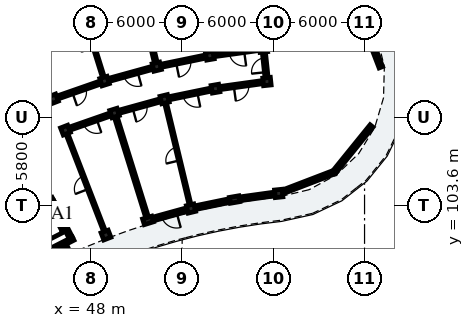
"""IFC4 building model, lengths in metres.
Left out: names, types, materials, properties, quantities, classifications, styles, units other than length and angle.
Written with IfcOpenShell. Run it as: python <this file> out.ifc"""

import sys

from ifc_helpers import new_model, si_unit, direction, frame, frame_2d, origin, origin_2d, place, context, subcontext, project, spatial, rectangle, extrude, element, fill, save


model = new_model("IFC4")
c1 = context("Model", 3, precision=1e-05, world=origin(), true_north=direction((0.0, 1.0)))
c2 = subcontext(c1, "Body", "Model", "MODEL_VIEW")
j1 = project(units=[si_unit("LENGTHUNIT", "METRE"), si_unit("PLANEANGLEUNIT", "RADIAN")], contexts=[c1])
p1 = place(None, origin())
s1 = spatial("IfcSite", under=j1, at=p1, CompositionType="ELEMENT")
p2 = place(p1, origin())
s2 = spatial("IfcBuilding", under=s1, at=p2, CompositionType="ELEMENT")
p3 = place(p2, frame((0.0, 0.0, 29.0)))
s3 = spatial("IfcBuildingStorey", under=s2, at=p3, CompositionType="ELEMENT", Elevation=29.0)
p4 = place(p3, frame((42.597, 102.561, 0.0), z_axis=(0.0, 0.0, 1.0), x_axis=(0.891001200497, 0.454000947921, 0.0)))
e1 = element("IfcWall", 1, at=p4, inside=s3, PredefinedType="SHEAR", context=c2, shape_type="SweptSolid", body=[
    extrude(rectangle(XDim=3.26, YDim=0.23, at=frame_2d((1.63, 0.0))), origin(), (0.0, 0.0, 1.0), 3.11),
])
p5 = place(p4, frame((0.9, 0.0, 0.0)))
e2 = element("IfcOpeningElement", 2, at=p5, cuts=e1, PredefinedType="OPENING", context=c2, shape_type="SweptSolid", body=[
    extrude(rectangle(XDim=1.1, YDim=2.15, at=frame_2d((0.55, 1.075))), frame((0.0, 0.125, 0.0), z_axis=(0.0, -1.0, 0.0), x_axis=(1.0, 0.0, 0.0)), (0.0, 0.0, 1.0), 0.25),
])
p6 = place(p3, frame((43.927, 99.95, 0.0), z_axis=(0.0, 0.0, 1.0), x_axis=(0.891016635648, 0.453970654337, 0.0)))
e3 = element("IfcWall", 3, at=p6, inside=s3, PredefinedType="SHEAR", context=c2, shape_type="SweptSolid", body=[
    extrude(rectangle(XDim=3.26, YDim=0.23, at=frame_2d((1.63, 0.0))), origin(), (0.0, 0.0, 1.0), 3.11),
])
p7 = place(p3, frame((45.451, 103.886, 0.0), z_axis=(0.0, 0.0, 1.0), x_axis=(0.454000278178, -0.891001541758, 0.0)))
e4 = element("IfcWall", 4, at=p7, inside=s3, PredefinedType="SHEAR", context=c2, shape_type="SweptSolid", body=[
    extrude(rectangle(XDim=2.7, YDim=0.23, at=frame_2d((1.35, 0.0))), origin(), (0.0, 0.0, 1.0), 3.11),
])
for number, where, z_axis, x_axis in (
    (5, (60.354, 104.406, 0.0), (0.0, 0.0, 1.0), (-0.105, 0.995, 0.0)),
    (6, (59.58, 111.766, 0.0), (0.0, 0.0, 1.0), (-0.105, 0.995, 0.0)),
    (7, (59.35, 113.954, 0.0), (0.0, 0.0, 1.0), (-0.105, 0.995, 0.0)),
):
    element("IfcColumn", number, at=place(p3, frame(where, z_axis=z_axis, x_axis=x_axis)), inside=s3, PredefinedType="COLUMN", context=c2, shape_type="SweptSolid", body=[
        extrude(rectangle(XDim=0.5, YDim=0.5, at=origin_2d()), origin(), (0.0, 0.0, 1.0), 3.115),
    ])
p8 = place(p3, frame((57.451, 104.004, 0.0), z_axis=(0.0, 0.0, 1.0), x_axis=(-0.169827298811, 0.985473839622, 0.0)))
e8 = element("IfcColumn", 8, at=p8, inside=s3, PredefinedType="PILASTER", context=c2, shape_type="SweptSolid", body=[
    extrude(rectangle(XDim=0.39, YDim=0.63, at=origin_2d()), origin(), (0.0, 0.0, 1.0), 3.115),
])
for number, where, z_axis, x_axis in (
    (9, (56.194, 111.297, 0.0), (0.0, 0.0, 1.0), (-0.17, 0.985, 0.0)),
    (10, (55.821, 113.465, 0.0), (0.0, 0.0, 1.0), (-0.17, 0.985, 0.0)),
    (11, (54.582, 103.412, 0.0), (0.0, 0.0, 1.0), (-0.234, 0.972, 0.0)),
    (12, (52.847, 110.606, 0.0), (0.0, 0.0, 1.0), (-0.234, 0.972, 0.0)),
    (13, (52.331, 112.744, 0.0), (0.0, 0.0, 1.0), (-0.234, 0.972, 0.0)),
):
    element("IfcColumn", number, at=place(p3, frame(where, z_axis=z_axis, x_axis=x_axis)), inside=s3, PredefinedType="COLUMN", context=c2, shape_type="SweptSolid", body=[
        extrude(rectangle(XDim=0.5, YDim=0.5, at=origin_2d()), origin(), (0.0, 0.0, 1.0), 3.115),
    ])
p9 = place(p3, frame((51.757, 102.631, 0.0), z_axis=(0.0, 0.0, 1.0), x_axis=(-0.297930292146, 0.954587628781, 0.0)))
e14 = element("IfcColumn", 14, at=p9, inside=s3, PredefinedType="PILASTER", context=c2, shape_type="SweptSolid", body=[
    extrude(rectangle(XDim=0.39, YDim=0.63, at=origin_2d()), origin(), (0.0, 0.0, 1.0), 3.115),
])
for number, where, z_axis, x_axis in (
    (15, (49.552, 109.695, 0.0), (0.0, 0.0, 1.0), (-0.298, 0.955, 0.0)),
    (16, (48.897, 111.795, 0.0), (0.0, 0.0, 1.0), (-0.298, 0.955, 0.0)),
    (17, (48.99, 101.667, 0.0), (0.0, 0.0, 1.0), (-0.36, 0.933, 0.0)),
    (18, (46.325, 108.57, 0.0), (0.0, 0.0, 1.0), (-0.36, 0.933, 0.0)),
    (19, (45.532, 110.622, 0.0), (0.0, 0.0, 1.0), (-0.36, 0.933, 0.0)),
):
    element("IfcColumn", number, at=place(p3, frame(where, z_axis=z_axis, x_axis=x_axis)), inside=s3, PredefinedType="COLUMN", context=c2, shape_type="SweptSolid", body=[
        extrude(rectangle(XDim=0.5, YDim=0.5, at=origin_2d()), origin(), (0.0, 0.0, 1.0), 3.115),
    ])
p10 = place(p3, frame((46.293, 100.522, 0.0), z_axis=(0.0, 0.0, 1.0), x_axis=(-0.420859924104, 0.907125638643, 0.0)))
e20 = element("IfcColumn", 20, at=p10, inside=s3, PredefinedType="PILASTER", context=c2, shape_type="SweptSolid", body=[
    extrude(rectangle(XDim=0.39, YDim=0.63, at=origin_2d()), origin(), (0.0, 0.0, 1.0), 3.115),
])
p11 = place(p3, frame((60.136, 104.376, 0.0), z_axis=(0.0, 0.0, 1.0), x_axis=(-0.990535426945, -0.137257305699, 0.0)))
e21 = element("IfcWall", 21, at=p11, inside=s3, PredefinedType="SOLIDWALL", context=c2, shape_type="SweptSolid", body=[
    extrude(rectangle(XDim=2.545, YDim=0.245, at=frame_2d((1.273, 0.0))), origin(), (0.0, 0.0, 1.0), 2.355),
])
p12 = place(p11, frame((0.683, 0.0, 0.55)))
e22 = element("IfcOpeningElement", 22, at=p12, cuts=e21, PredefinedType="OPENING", context=c2, shape_type="SweptSolid", body=[
    extrude(rectangle(XDim=1.18, YDim=1.48, at=frame_2d((0.59, 0.74))), frame((0.0, 0.133, 0.0), z_axis=(0.0, -1.0, 0.0), x_axis=(1.0, 0.0, 0.0)), (0.0, 0.0, 1.0), 0.265),
])
p13 = place(p3, frame((57.29, 103.971, 0.0), z_axis=(0.0, 0.0, 1.0), x_axis=(-0.979344333802, -0.20219959409, 0.0)))
e23 = element("IfcWall", 23, at=p13, inside=s3, PredefinedType="SOLIDWALL", context=c2, shape_type="SweptSolid", body=[
    extrude(rectangle(XDim=2.545, YDim=0.245, at=frame_2d((1.272, 0.0))), origin(), (0.0, 0.0, 1.0), 2.355),
])
p14 = place(p13, frame((0.533, 0.0, 0.55)))
e24 = element("IfcOpeningElement", 24, at=p14, cuts=e23, PredefinedType="OPENING", context=c2, shape_type="SweptSolid", body=[
    extrude(rectangle(XDim=1.48, YDim=1.62, at=frame_2d((0.74, 0.81))), frame((0.0, 0.133, 0.0), z_axis=(0.0, -1.0, 0.0), x_axis=(1.0, 0.0, 0.0)), (0.0, 0.0, 1.0), 0.265),
])
p15 = place(p3, frame((54.369, 103.353, 0.0), z_axis=(0.0, 0.0, 1.0), x_axis=(-0.963872968618, -0.26636234788, 0.0)))
e25 = element("IfcWall", 25, at=p15, inside=s3, PredefinedType="SOLIDWALL", context=c2, shape_type="SweptSolid", body=[
    extrude(rectangle(XDim=2.545, YDim=0.245, at=frame_2d((1.273, 0.0))), origin(), (0.0, 0.0, 1.0), 2.355),
])
p16 = place(p15, frame((0.763, 0.0, 0.0)))
e26 = element("IfcOpeningElement", 26, at=p16, cuts=e25, PredefinedType="OPENING", context=c2, shape_type="SweptSolid", body=[
    extrude(rectangle(XDim=1.02, YDim=2.14, at=frame_2d((0.51, 1.07))), frame((0.0, 0.133, 0.0), z_axis=(0.0, -1.0, 0.0), x_axis=(1.0, 0.0, 0.0)), (0.0, 0.0, 1.0), 0.265),
])
p17 = place(p3, frame((65.673, 116.353, 0.0), z_axis=(0.0, 0.0, 1.0), x_axis=(0.358376224971, -0.933577249817, 0.0)))
e27 = element("IfcWall", 27, at=p17, inside=s3, PredefinedType="SOLIDWALL", context=c2, shape_type="SweptSolid", body=[
    extrude(rectangle(XDim=3.908, YDim=0.245, at=frame_2d((1.954, 0.0))), origin(), (0.0, 0.0, 1.0), 2.355),
])
p18 = place(p3, frame((66.462, 108.844, 0.0), z_axis=(0.0, 0.0, 1.0), x_axis=(-0.629331205321, -0.777137204109, 0.0)))
e28 = element("IfcWall", 28, at=p18, inside=s3, PredefinedType="SOLIDWALL", context=c2, shape_type="SweptSolid", body=[
    extrude(rectangle(XDim=3.908, YDim=0.245, at=frame_2d((1.954, 0.0))), origin(), (0.0, 0.0, 1.0), 2.355),
])
p19 = place(p18, frame((0.979, 0.0, 0.4)))
e29 = element("IfcOpeningElement", 29, at=p19, cuts=e28, PredefinedType="OPENING", context=c2, shape_type="SweptSolid", body=[
    extrude(rectangle(XDim=1.95, YDim=1.78, at=frame_2d((0.975, 0.89))), frame((0.0, 0.133, 0.0), z_axis=(0.0, -1.0, 0.0), x_axis=(1.0, 0.0, 0.0)), (0.0, 0.0, 1.0), 0.265),
])
p20 = place(p3, frame((64.002, 105.807, 0.0), z_axis=(0.0, 0.0, 1.0), x_axis=(-0.93356922619, -0.35839712598, 0.0)))
e30 = element("IfcWall", 30, at=p20, inside=s3, PredefinedType="SOLIDWALL", context=c2, shape_type="SweptSolid", body=[
    extrude(rectangle(XDim=3.908, YDim=0.245, at=frame_2d((1.954, 0.0))), origin(), (0.0, 0.0, 1.0), 2.355),
])
p21 = place(p3, frame((59.004, 113.906, 0.0), z_axis=(0.0, 0.0, 1.0), x_axis=(-0.990544162976, -0.137194246211, 0.0)))
e31 = element("IfcWall", 31, at=p21, inside=s3, PredefinedType="PARTITIONING", context=c2, shape_type="SweptSolid", body=[
    extrude(rectangle(XDim=2.863, YDim=0.205, at=frame_2d((1.432, 0.0))), origin(), (0.0, 0.0, 1.0), 2.37),
])
p22 = place(p21, frame((0.937, 0.0, 0.0)))
e32 = element("IfcOpeningElement", 32, at=p22, cuts=e31, PredefinedType="OPENING", context=c2, shape_type="SweptSolid", body=[
    extrude(rectangle(XDim=0.99, YDim=2.16, at=frame_2d((0.495, 1.08))), frame((0.0, 0.113, 0.0), z_axis=(0.0, -1.0, 0.0), x_axis=(1.0, 0.0, 0.0)), (0.0, 0.0, 1.0), 0.225),
])
p23 = place(p3, frame((59.233, 111.718, 0.0), z_axis=(0.0, 0.0, 1.0), x_axis=(-0.990535404475, -0.137257467855, 0.0)))
e33 = element("IfcWall", 33, at=p23, inside=s3, PredefinedType="PARTITIONING", context=c2, shape_type="SweptSolid", body=[
    extrude(rectangle(XDim=2.718, YDim=0.205, at=frame_2d((1.359, 0.0))), origin(), (0.0, 0.0, 1.0), 2.37),
])
p24 = place(p23, frame((0.864, 0.0, 0.0)))
e34 = element("IfcOpeningElement", 34, at=p24, cuts=e33, PredefinedType="OPENING", context=c2, shape_type="SweptSolid", body=[
    extrude(rectangle(XDim=0.99, YDim=2.16, at=frame_2d((0.495, 1.08))), frame((0.0, 0.113, 0.0), z_axis=(0.0, -1.0, 0.0), x_axis=(1.0, 0.0, 0.0)), (0.0, 0.0, 1.0), 0.225),
])
p25 = place(p3, frame((55.478, 113.394, 0.0), z_axis=(0.0, 0.0, 1.0), x_axis=(-0.979348418612, -0.202179808492, 0.0)))
e35 = element("IfcWall", 35, at=p25, inside=s3, PredefinedType="PARTITIONING", context=c2, shape_type="SweptSolid", body=[
    extrude(rectangle(XDim=2.863, YDim=0.205, at=frame_2d((1.432, 0.0))), origin(), (0.0, 0.0, 1.0), 2.37),
])
p26 = place(p25, frame((0.947, 0.0, 0.0)))
e36 = element("IfcOpeningElement", 36, at=p26, cuts=e35, PredefinedType="OPENING", context=c2, shape_type="SweptSolid", body=[
    extrude(rectangle(XDim=0.97, YDim=2.15, at=frame_2d((0.485, 1.075))), frame((0.0, 0.113, 0.0), z_axis=(0.0, -1.0, 0.0), x_axis=(1.0, 0.0, 0.0)), (0.0, 0.0, 1.0), 0.225),
])
p27 = place(p3, frame((55.852, 111.226, 0.0), z_axis=(0.0, 0.0, 1.0), x_axis=(-0.979349423541, -0.202174940608, 0.0)))
e37 = element("IfcWall", 37, at=p27, inside=s3, PredefinedType="PARTITIONING", context=c2, shape_type="SweptSolid", body=[
    extrude(rectangle(XDim=2.718, YDim=0.205, at=frame_2d((1.359, 0.0))), origin(), (0.0, 0.0, 1.0), 2.37),
])
p28 = place(p27, frame((0.874, 0.0, 0.0)))
e38 = element("IfcOpeningElement", 38, at=p28, cuts=e37, PredefinedType="OPENING", context=c2, shape_type="SweptSolid", body=[
    extrude(rectangle(XDim=0.97, YDim=2.15, at=frame_2d((0.485, 1.075))), frame((0.0, 0.113, 0.0), z_axis=(0.0, -1.0, 0.0), x_axis=(1.0, 0.0, 0.0)), (0.0, 0.0, 1.0), 0.225),
])
p29 = place(p3, frame((52.238, 113.133, 0.0), z_axis=(0.0, 0.0, 1.0), x_axis=(-0.234386624934, 0.972143461662, 0.0)))
e39 = element("IfcWall", 39, at=p29, inside=s3, PredefinedType="PARTITIONING", context=c2, shape_type="SweptSolid", body=[
    extrude(rectangle(XDim=4.7, YDim=0.185, at=frame_2d((2.35, 0.0))), origin(), (0.0, 0.0, 1.0), 2.37),
])
p30 = place(p3, frame((54.488, 103.801, 0.0), z_axis=(0.0, 0.0, 1.0), x_axis=(-0.234406698576, 0.972138621629, 0.0)))
e40 = element("IfcWall", 40, at=p30, inside=s3, PredefinedType="PARTITIONING", context=c2, shape_type="SweptSolid", body=[
    extrude(rectangle(XDim=6.6, YDim=0.125, at=frame_2d((3.3, 0.0))), origin(), (0.0, 0.0, 1.0), 2.37),
])
p31 = place(p30, frame((2.855, 0.0, 0.0)))
e41 = element("IfcOpeningElement", 41, at=p31, cuts=e40, PredefinedType="OPENING", context=c2, shape_type="SweptSolid", body=[
    extrude(rectangle(XDim=0.89, YDim=2.1, at=frame_2d((0.445, 1.05))), frame((0.0, 0.073, 0.0), z_axis=(0.0, -1.0, 0.0), x_axis=(1.0, 0.0, 0.0)), (0.0, 0.0, 1.0), 0.145),
])
p32 = place(p3, frame((51.994, 112.651, 0.0), z_axis=(0.0, 0.0, 1.0), x_axis=(-0.963890789093, -0.266297853356, 0.0)))
e42 = element("IfcWall", 42, at=p32, inside=s3, PredefinedType="PARTITIONING", context=c2, shape_type="SweptSolid", body=[
    extrude(rectangle(XDim=2.863, YDim=0.205, at=frame_2d((1.432, 0.0))), origin(), (0.0, 0.0, 1.0), 2.37),
])
p33 = place(p32, frame((0.957, 0.0, 0.0)))
e43 = element("IfcOpeningElement", 43, at=p33, cuts=e42, PredefinedType="OPENING", context=c2, shape_type="SweptSolid", body=[
    extrude(rectangle(XDim=0.95, YDim=2.13, at=frame_2d((0.475, 1.065))), frame((0.0, 0.113, 0.0), z_axis=(0.0, -1.0, 0.0), x_axis=(1.0, 0.0, 0.0)), (0.0, 0.0, 1.0), 0.225),
])
p34 = place(p3, frame((52.51, 110.512, 0.0), z_axis=(0.0, 0.0, 1.0), x_axis=(-0.96388375821, -0.266323301006, 0.0)))
e44 = element("IfcWall", 44, at=p34, inside=s3, PredefinedType="PARTITIONING", context=c2, shape_type="SweptSolid", body=[
    extrude(rectangle(XDim=2.718, YDim=0.205, at=frame_2d((1.359, 0.0))), origin(), (0.0, 0.0, 1.0), 2.37),
])
p35 = place(p34, frame((0.884, 0.0, 0.0)))
e45 = element("IfcOpeningElement", 45, at=p35, cuts=e44, PredefinedType="OPENING", context=c2, shape_type="SweptSolid", body=[
    extrude(rectangle(XDim=0.95, YDim=2.13, at=frame_2d((0.475, 1.065))), frame((0.0, 0.113, 0.0), z_axis=(0.0, -1.0, 0.0), x_axis=(1.0, 0.0, 0.0)), (0.0, 0.0, 1.0), 0.225),
])
p36 = place(p3, frame((48.778, 112.177, 0.0), z_axis=(0.0, 0.0, 1.0), x_axis=(-0.297905254614, 0.954595442726, 0.0)))
e46 = element("IfcWall", 46, at=p36, inside=s3, PredefinedType="PARTITIONING", context=c2, shape_type="SweptSolid", body=[
    extrude(rectangle(XDim=4.7, YDim=0.125, at=frame_2d((2.35, 0.0))), origin(), (0.0, 0.0, 1.0), 2.37),
])
p37 = place(p36, frame((1.905, 0.0, 0.0)))
e47 = element("IfcOpeningElement", 47, at=p37, cuts=e46, PredefinedType="OPENING", context=c2, shape_type="SweptSolid", body=[
    extrude(rectangle(XDim=0.89, YDim=2.1, at=frame_2d((0.445, 1.05))), frame((0.0, 0.073, 0.0), z_axis=(0.0, -1.0, 0.0), x_axis=(1.0, 0.0, 0.0)), (0.0, 0.0, 1.0), 0.145),
])
p38 = place(p3, frame((51.638, 103.013, 0.0), z_axis=(0.0, 0.0, 1.0), x_axis=(-0.2979590431, 0.954578655028, 0.0)))
e48 = element("IfcWall", 48, at=p38, inside=s3, PredefinedType="PARTITIONING", context=c2, shape_type="SweptSolid", body=[
    extrude(rectangle(XDim=6.6, YDim=0.185, at=frame_2d((3.3, 0.0))), origin(), (0.0, 0.0, 1.0), 2.37),
])
p39 = place(p3, frame((48.566, 111.68, 0.0), z_axis=(0.0, 0.0, 1.0), x_axis=(-0.944253820929, -0.329218349522, 0.0)))
e49 = element("IfcWall", 49, at=p39, inside=s3, PredefinedType="PARTITIONING", context=c2, shape_type="SweptSolid", body=[
    extrude(rectangle(XDim=2.863, YDim=0.205, at=frame_2d((1.432, 0.0))), origin(), (0.0, 0.0, 1.0), 2.37),
])
p40 = place(p39, frame((0.967, 0.0, 0.0)))
e50 = element("IfcOpeningElement", 50, at=p40, cuts=e49, PredefinedType="OPENING", context=c2, shape_type="SweptSolid", body=[
    extrude(rectangle(XDim=0.93, YDim=2.12, at=frame_2d((0.465, 1.06))), frame((0.0, 0.113, 0.0), z_axis=(0.0, -1.0, 0.0), x_axis=(1.0, 0.0, 0.0)), (0.0, 0.0, 1.0), 0.225),
])
p41 = place(p3, frame((49.222, 109.58, 0.0), z_axis=(0.0, 0.0, 1.0), x_axis=(-0.944265123647, -0.329185929627, 0.0)))
e51 = element("IfcWall", 51, at=p41, inside=s3, PredefinedType="PARTITIONING", context=c2, shape_type="SweptSolid", body=[
    extrude(rectangle(XDim=2.718, YDim=0.205, at=frame_2d((1.359, 0.0))), origin(), (0.0, 0.0, 1.0), 2.37),
])
p42 = place(p41, frame((0.894, 0.0, 0.0)))
e52 = element("IfcOpeningElement", 52, at=p42, cuts=e51, PredefinedType="OPENING", context=c2, shape_type="SweptSolid", body=[
    extrude(rectangle(XDim=0.93, YDim=2.12, at=frame_2d((0.465, 1.06))), frame((0.0, 0.113, 0.0), z_axis=(0.0, -1.0, 0.0), x_axis=(1.0, 0.0, 0.0)), (0.0, 0.0, 1.0), 0.225),
])
p43 = place(p3, frame((48.846, 102.04, 0.0), z_axis=(0.0, 0.0, 1.0), x_axis=(-0.360183473608, 0.932881485152, 0.0)))
e53 = element("IfcWall", 53, at=p43, inside=s3, PredefinedType="PARTITIONING", context=c2, shape_type="SweptSolid", body=[
    extrude(rectangle(XDim=6.6, YDim=0.125, at=frame_2d((3.3, 0.0))), origin(), (0.0, 0.0, 1.0), 2.37),
])
p44 = place(p43, frame((2.845, 0.0, 0.0)))
e54 = element("IfcOpeningElement", 54, at=p44, cuts=e53, PredefinedType="OPENING", context=c2, shape_type="SweptSolid", body=[
    extrude(rectangle(XDim=0.91, YDim=2.1, at=frame_2d((0.455, 1.05))), frame((0.0, 0.073, 0.0), z_axis=(0.0, -1.0, 0.0), x_axis=(1.0, 0.0, 0.0)), (0.0, 0.0, 1.0), 0.145),
])
p45 = place(p3, frame((59.575, 111.816, 0.0), z_axis=(0.0, 0.0, 1.0), x_axis=(-0.104509292252, 0.994523910136, 0.0)))
e55 = element("IfcWall", 55, at=p45, inside=s3, PredefinedType="PARTITIONING", context=c2, shape_type="SweptSolid", body=[
    extrude(rectangle(XDim=2.1, YDim=0.205, at=frame_2d((1.05, 0.0))), origin(), (0.0, 0.0, 1.0), 2.37),
])
p46 = place(p45, frame((0.57, 0.0, 0.0)))
e56 = element("IfcOpeningElement", 56, at=p46, cuts=e55, PredefinedType="OPENING", context=c2, shape_type="SweptSolid", body=[
    extrude(rectangle(XDim=0.95, YDim=2.13, at=frame_2d((0.475, 1.065))), frame((0.0, 0.113, 0.0), z_axis=(0.0, -1.0, 0.0), x_axis=(1.0, 0.0, 0.0)), (0.0, 0.0, 1.0), 0.225),
])
p47 = place(p12, origin())
e57 = element("IfcWindow", 57, at=p47, inside=s3, PartitioningType="SINGLE_PANEL", PredefinedType="WINDOW", context=c2, shape_type="SweptSolid", body=[
    extrude(rectangle(XDim=1.18, YDim=1.48, at=frame_2d((0.59, 0.74))), frame((0.0, 0.03, 0.0), z_axis=(0.0, -1.0, 0.0), x_axis=(1.0, 0.0, 0.0)), (0.0, 0.0, 1.0), 0.06),
])
fill(e22, e57)
p48 = place(p14, origin())
e58 = element("IfcWindow", 58, at=p48, inside=s3, PartitioningType="SINGLE_PANEL", PredefinedType="WINDOW", context=c2, shape_type="SweptSolid", body=[
    extrude(rectangle(XDim=1.48, YDim=1.62, at=frame_2d((0.74, 0.81))), frame((0.0, 0.03, 0.0), z_axis=(0.0, -1.0, 0.0), x_axis=(1.0, 0.0, 0.0)), (0.0, 0.0, 1.0), 0.06),
])
fill(e24, e58)
p49 = place(p16, origin())
e59 = element("IfcDoor", 59, at=p49, inside=s3, OperationType="SINGLE_SWING_LEFT", PredefinedType="DOOR", context=c2, shape_type="SweptSolid", body=[
    extrude(rectangle(XDim=1.02, YDim=2.14, at=frame_2d((0.51, 1.07))), frame((0.0, 0.025, 0.0), z_axis=(0.0, -1.0, 0.0), x_axis=(1.0, 0.0, 0.0)), (0.0, 0.0, 1.0), 0.05),
])
fill(e26, e59)
p50 = place(p19, origin())
e60 = element("IfcWindow", 60, at=p50, inside=s3, PartitioningType="SINGLE_PANEL", PredefinedType="WINDOW", context=c2, shape_type="SweptSolid", body=[
    extrude(rectangle(XDim=1.95, YDim=1.78, at=frame_2d((0.975, 0.89))), frame((0.0, 0.03, 0.0), z_axis=(0.0, -1.0, 0.0), x_axis=(1.0, 0.0, 0.0)), (0.0, 0.0, 1.0), 0.06),
])
fill(e29, e60)
p51 = place(p22, origin())
e61 = element("IfcDoor", 61, at=p51, inside=s3, OperationType="SINGLE_SWING_LEFT", PredefinedType="DOOR", context=c2, shape_type="SweptSolid", body=[
    extrude(rectangle(XDim=0.99, YDim=2.16, at=frame_2d((0.495, 1.08))), frame((0.0, 0.025, 0.0), z_axis=(0.0, -1.0, 0.0), x_axis=(1.0, 0.0, 0.0)), (0.0, 0.0, 1.0), 0.05),
])
fill(e32, e61)
p52 = place(p24, origin())
e62 = element("IfcDoor", 62, at=p52, inside=s3, OperationType="SINGLE_SWING_RIGHT", PredefinedType="DOOR", context=c2, shape_type="SweptSolid", body=[
    extrude(rectangle(XDim=0.99, YDim=2.16, at=frame_2d((0.495, 1.08))), frame((0.0, 0.025, 0.0), z_axis=(0.0, -1.0, 0.0), x_axis=(1.0, 0.0, 0.0)), (0.0, 0.0, 1.0), 0.05),
])
fill(e34, e62)
p53 = place(p26, origin())
e63 = element("IfcDoor", 63, at=p53, inside=s3, OperationType="SINGLE_SWING_RIGHT", PredefinedType="DOOR", context=c2, shape_type="SweptSolid", body=[
    extrude(rectangle(XDim=0.97, YDim=2.15, at=frame_2d((0.485, 1.075))), frame((0.0, 0.025, 0.0), z_axis=(0.0, -1.0, 0.0), x_axis=(1.0, 0.0, 0.0)), (0.0, 0.0, 1.0), 0.05),
])
fill(e36, e63)
p54 = place(p28, origin())
e64 = element("IfcDoor", 64, at=p54, inside=s3, OperationType="SINGLE_SWING_LEFT", PredefinedType="DOOR", context=c2, shape_type="SweptSolid", body=[
    extrude(rectangle(XDim=0.97, YDim=2.15, at=frame_2d((0.485, 1.075))), frame((0.0, 0.025, 0.0), z_axis=(0.0, -1.0, 0.0), x_axis=(1.0, 0.0, 0.0)), (0.0, 0.0, 1.0), 0.05),
])
fill(e38, e64)
p55 = place(p31, origin())
e65 = element("IfcDoor", 65, at=p55, inside=s3, OperationType="SINGLE_SWING_LEFT", PredefinedType="DOOR", context=c2, shape_type="SweptSolid", body=[
    extrude(rectangle(XDim=0.89, YDim=2.1, at=frame_2d((0.445, 1.05))), frame((0.0, 0.025, 0.0), z_axis=(0.0, -1.0, 0.0), x_axis=(1.0, 0.0, 0.0)), (0.0, 0.0, 1.0), 0.05),
])
fill(e41, e65)
p56 = place(p33, origin())
e66 = element("IfcDoor", 66, at=p56, inside=s3, OperationType="SINGLE_SWING_LEFT", PredefinedType="DOOR", context=c2, shape_type="SweptSolid", body=[
    extrude(rectangle(XDim=0.95, YDim=2.13, at=frame_2d((0.475, 1.065))), frame((0.0, 0.025, 0.0), z_axis=(0.0, -1.0, 0.0), x_axis=(1.0, 0.0, 0.0)), (0.0, 0.0, 1.0), 0.05),
])
fill(e43, e66)
p57 = place(p35, origin())
e67 = element("IfcDoor", 67, at=p57, inside=s3, OperationType="SINGLE_SWING_RIGHT", PredefinedType="DOOR", context=c2, shape_type="SweptSolid", body=[
    extrude(rectangle(XDim=0.95, YDim=2.13, at=frame_2d((0.475, 1.065))), frame((0.0, 0.025, 0.0), z_axis=(0.0, -1.0, 0.0), x_axis=(1.0, 0.0, 0.0)), (0.0, 0.0, 1.0), 0.05),
])
fill(e45, e67)
p58 = place(p40, origin())
e68 = element("IfcDoor", 68, at=p58, inside=s3, OperationType="SINGLE_SWING_RIGHT", PredefinedType="DOOR", context=c2, shape_type="SweptSolid", body=[
    extrude(rectangle(XDim=0.93, YDim=2.12, at=frame_2d((0.465, 1.06))), frame((0.0, 0.025, 0.0), z_axis=(0.0, -1.0, 0.0), x_axis=(1.0, 0.0, 0.0)), (0.0, 0.0, 1.0), 0.05),
])
fill(e50, e68)
p59 = place(p42, origin())
e69 = element("IfcDoor", 69, at=p59, inside=s3, OperationType="SINGLE_SWING_LEFT", PredefinedType="DOOR", context=c2, shape_type="SweptSolid", body=[
    extrude(rectangle(XDim=0.93, YDim=2.12, at=frame_2d((0.465, 1.06))), frame((0.0, 0.025, 0.0), z_axis=(0.0, -1.0, 0.0), x_axis=(1.0, 0.0, 0.0)), (0.0, 0.0, 1.0), 0.05),
])
fill(e52, e69)
p60 = place(p44, origin())
e70 = element("IfcDoor", 70, at=p60, inside=s3, OperationType="SINGLE_SWING_LEFT", PredefinedType="DOOR", context=c2, shape_type="SweptSolid", body=[
    extrude(rectangle(XDim=0.91, YDim=2.1, at=frame_2d((0.455, 1.05))), frame((0.0, 0.025, 0.0), z_axis=(0.0, -1.0, 0.0), x_axis=(1.0, 0.0, 0.0)), (0.0, 0.0, 1.0), 0.05),
])
fill(e54, e70)
p61 = place(p46, origin())
e71 = element("IfcDoor", 71, at=p61, inside=s3, OperationType="SINGLE_SWING_LEFT", PredefinedType="DOOR", context=c2, shape_type="SweptSolid", body=[
    extrude(rectangle(XDim=0.95, YDim=2.13, at=frame_2d((0.475, 1.065))), frame((0.0, 0.025, 0.0), z_axis=(0.0, -1.0, 0.0), x_axis=(1.0, 0.0, 0.0)), (0.0, 0.0, 1.0), 0.05),
])
fill(e56, e71)
save(model, sys.argv[1])
